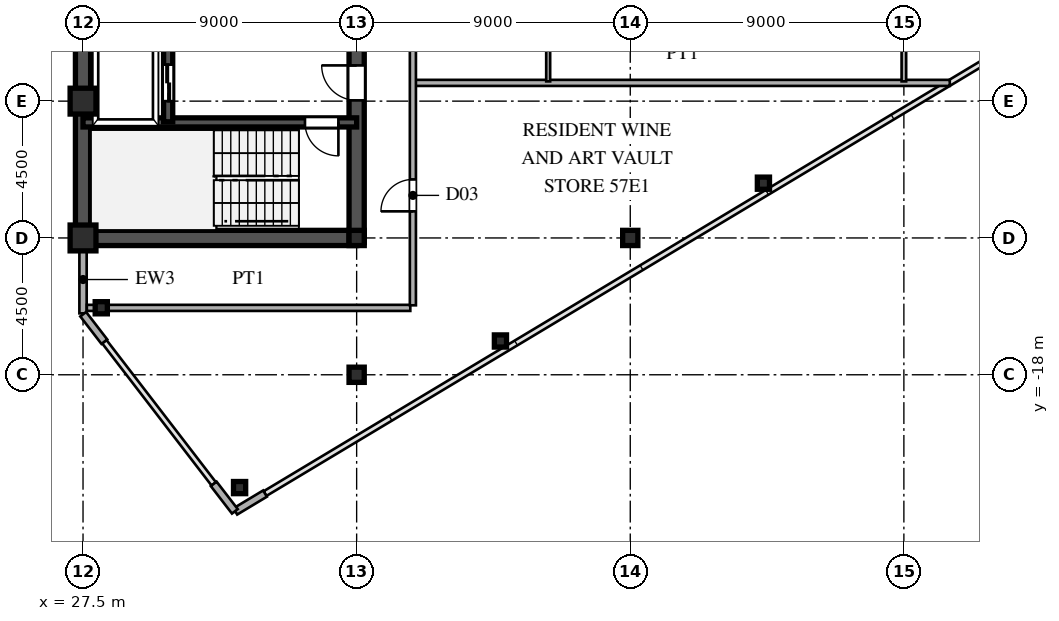
"""IFC4 building model, lengths in metres.
Left out: names, types, materials, properties, quantities, classifications, styles, units other than length and angle.
Written with IfcOpenShell. Run it as: python <this file> out.ifc"""

import sys

from ifc_helpers import new_model, si_unit, direction, frame, frame_2d, origin, origin_2d, place, context, subcontext, project, spatial, rectangle, hollow_rectangle, i_section, extrude, source, transform, mapped, element, fill, save


model = new_model("IFC4")
c1 = context("Model", 3, precision=1e-05, world=origin(), true_north=direction((0.0, 1.0)))
c2 = subcontext(c1, "Body", "Model", "MODEL_VIEW")
j1 = project(units=[si_unit("LENGTHUNIT", "METRE"), si_unit("PLANEANGLEUNIT", "RADIAN")], contexts=[c1])
p1 = place(None, origin())
s1 = spatial("IfcSite", under=j1, at=p1, CompositionType="ELEMENT")
p2 = place(p1, origin())
s2 = spatial("IfcBuilding", under=s1, at=p2, CompositionType="ELEMENT")
p3 = place(p2, frame((0.0, 0.0, 213.9)))
s3 = spatial("IfcBuildingStorey", under=s2, at=p3, CompositionType="ELEMENT", Elevation=213.9)
m1 = source(origin(), c2, "Body", "SweptSolid", [
    extrude(hollow_rectangle(XDim=0.85, YDim=0.85, WallThickness=0.036, at=origin_2d()), origin(), (0.0, 0.0, 1.0), 3.6),
])
for number, where, z_axis, x_axis in (
    (1, (27.5, -13.5, 0.0), (0.0, 0.0, 1.0), (1.0, 0.0, 0.0)),
    (2, (27.5, -9.0, 0.0), (0.0, 0.0, 1.0), (1.0, 0.0, 0.0)),
):
    element("IfcColumn", number, at=place(p3, frame(where, z_axis=z_axis, x_axis=x_axis)), inside=s3, PredefinedType="COLUMN", context=c2, shape_type="MappedRepresentation", body=[
        mapped(m1, transform((0.0, 0.0, 0.0), scale=1.0)),
    ])
m2 = source(origin(), c2, "Body", "SweptSolid", [
    extrude(i_section(OverallWidth=0.5, OverallDepth=0.5, WebThickness=0.02, FlangeThickness=0.032, at=origin_2d()), origin(), (0.0, 0.0, 1.0), 3.6),
])
for number, where, z_axis, x_axis in (
    (3, (36.5, -18.0, 0.0), (0.0, 0.0, 1.0), (1.0, 0.0, 0.0)),
    (4, (36.5, -13.5, 0.0), (0.0, 0.0, 1.0), (1.0, 0.0, 0.0)),
    (5, (45.5, -13.5, 0.0), (0.0, 0.0, 1.0), (1.0, 0.0, 0.0)),
):
    element("IfcColumn", number, at=place(p3, frame(where, z_axis=z_axis, x_axis=x_axis)), inside=s3, PredefinedType="COLUMN", context=c2, shape_type="MappedRepresentation", body=[
        mapped(m2, transform((0.0, 0.0, 0.0), scale=1.0)),
    ])
m3 = source(origin(), c2, "Body", "SweptSolid", [
    extrude(hollow_rectangle(XDim=0.4, YDim=0.4, WallThickness=0.016, at=origin_2d()), origin(), (0.0, 0.0, 1.0), 3.6),
])
for number, where, z_axis, x_axis in (
    (6, (32.65, -21.71, 0.0), (0.0, 0.0, 1.0), (1.0, 0.0, 0.0)),
    (7, (28.1, -15.796, 0.0), (0.0, 0.0, 1.0), (1.0, 0.0, 0.0)),
    (8, (41.23, -16.889, 0.0), (0.0, 0.0, 1.0), (1.0, 0.0, 0.0)),
    (9, (49.88, -11.699, 0.0), (0.0, 0.0, 1.0), (1.0, 0.0, 0.0)),
):
    element("IfcColumn", number, at=place(p3, frame(where, z_axis=z_axis, x_axis=x_axis)), inside=s3, PredefinedType="COLUMN", context=c2, shape_type="MappedRepresentation", body=[
        mapped(m3, transform((0.0, 0.0, 0.0), scale=1.0)),
    ])
p4 = place(p3, frame((32.509, -22.495, 0.0), z_axis=(0.0, 0.0, 1.0), x_axis=(0.85743623509, 0.514590228002, 0.0)))
e10 = element("IfcWall", 10, at=p4, inside=s3, PredefinedType="SOLIDWALL", context=c2, shape_type="SweptSolid", body=[
    extrude(rectangle(XDim=1.14, YDim=0.24, at=frame_2d((0.57, 0.0))), origin(), (0.0, 0.0, 1.0), 3.38),
])
p5 = place(p3, frame((27.5, -15.98, 0.0), z_axis=(0.0, 0.0, 1.0), x_axis=(0.0, 1.0, 0.0)))
e11 = element("IfcWall", 11, at=p5, inside=s3, PredefinedType="SOLIDWALL", context=c2, shape_type="SweptSolid", body=[
    extrude(rectangle(XDim=1.605, YDim=0.24, at=frame_2d((0.803, 0.0))), origin(), (0.0, 0.0, 1.0), 3.38),
])
p6 = place(p3, frame((27.5, -14.375, 0.0), z_axis=(0.0, 0.0, 1.0), x_axis=(0.0, 1.0, 0.0)))
e12 = element("IfcWall", 12, at=p6, inside=s3, PredefinedType="SOLIDWALL", context=c2, shape_type="SweptSolid", body=[
    extrude(rectangle(XDim=0.62, YDim=0.24, at=frame_2d((0.31, 0.0))), origin(), (0.0, 0.0, 1.0), 2.88),
])
for number, where, z_axis, x_axis in (
    (13, (27.506, -16.008, 0.0), (0.0, 0.0, 1.0), (0.61, -0.793, 0.0)),
    (14, (31.799, -21.588, 0.0), (0.0, 0.0, 1.0), (0.61, -0.793, 0.0)),
):
    element("IfcWall", number, at=place(p3, frame(where, z_axis=z_axis, x_axis=x_axis)), inside=s3, PredefinedType="SOLIDWALL", context=c2, shape_type="SweptSolid", body=[
        extrude(rectangle(XDim=1.14, YDim=0.24, at=frame_2d((0.57, 0.0))), origin(), (0.0, 0.0, 1.0), 3.38),
    ])
p7 = place(p3, frame((27.5, -13.5, 0.0), z_axis=(0.0, 0.0, 1.0), x_axis=(0.0, 1.0, 0.0)))
e15 = element("IfcWall", 15, at=p7, inside=s3, PredefinedType="SHEAR", context=c2, shape_type="SweptSolid", body=[
    extrude(rectangle(XDim=12.2, YDim=0.5, at=frame_2d((6.1, 0.0))), origin(), (0.0, 0.0, 1.0), 3.38),
])
p8 = place(p3, frame((27.5, -13.5, 0.0), z_axis=(0.0, 0.0, 1.0), x_axis=(1.0, 0.0, 0.0)))
e16 = element("IfcWall", 16, at=p8, inside=s3, PredefinedType="SHEAR", context=c2, shape_type="SweptSolid", body=[
    extrude(rectangle(XDim=9.0, YDim=0.5, at=frame_2d((4.5, 0.0))), origin(), (0.0, 0.0, 1.0), 3.38),
])
p9 = place(p3, frame((36.5, -13.65, 0.0), z_axis=(0.0, 0.0, 1.0), x_axis=(0.0, 1.0, 0.0)))
e17 = element("IfcWall", 17, at=p9, inside=s3, PredefinedType="SHEAR", context=c2, shape_type="SweptSolid", body=[
    extrude(rectangle(XDim=7.15, YDim=0.5, at=frame_2d((3.575, 0.0))), origin(), (0.0, 0.0, 1.0), 3.38),
])
p10 = place(p9, frame((4.675, 0.0, 0.0)))
e18 = element("IfcOpeningElement", 18, at=p10, cuts=e17, PredefinedType="OPENING", context=c2, shape_type="SweptSolid", body=[
    extrude(rectangle(XDim=1.15, YDim=2.2, at=frame_2d((0.575, 1.1))), frame((0.0, 0.26, 0.0), z_axis=(0.0, -1.0, 0.0), x_axis=(1.0, 0.0, 0.0)), (0.0, 0.0, 1.0), 0.52),
])
p11 = place(p3, frame((27.5, -9.7, 0.0), z_axis=(0.0, 0.0, 1.0), x_axis=(1.0, 0.0, 0.0)))
e19 = element("IfcWall", 19, at=p11, inside=s3, PredefinedType="SHEAR", context=c2, shape_type="SweptSolid", body=[
    extrude(rectangle(XDim=9.0, YDim=0.3, at=frame_2d((4.5, 0.0))), origin(), (0.0, 0.0, 1.0), 3.38),
])
p12 = place(p11, frame((7.3, 0.0, 0.0)))
e20 = element("IfcOpeningElement", 20, at=p12, cuts=e19, PredefinedType="OPENING", context=c2, shape_type="SweptSolid", body=[
    extrude(rectangle(XDim=1.1, YDim=2.2, at=frame_2d((0.55, 1.1))), frame((0.0, 0.16, 0.0), z_axis=(0.0, -1.0, 0.0), x_axis=(1.0, 0.0, 0.0)), (0.0, 0.0, 1.0), 0.32),
])
p13 = place(p3, frame((30.3, -9.68, 0.0), z_axis=(0.0, 0.0, 1.0), x_axis=(0.0, 1.0, 0.0)))
e21 = element("IfcWall", 21, at=p13, inside=s3, PredefinedType="SHEAR", context=c2, shape_type="SweptSolid", body=[
    extrude(rectangle(XDim=2.56, YDim=0.3, at=frame_2d((1.28, 0.0))), origin(), (0.0, 0.0, 1.0), 3.38),
])
p14 = place(p13, frame((0.68, 0.0, 0.0)))
e22 = element("IfcOpeningElement", 22, at=p14, cuts=e21, PredefinedType="OPENING", context=c2, shape_type="SweptSolid", body=[
    extrude(rectangle(XDim=1.2, YDim=2.25, at=frame_2d((0.6, 1.125))), frame((0.0, 0.16, 0.0), z_axis=(0.0, -1.0, 0.0), x_axis=(1.0, 0.0, 0.0)), (0.0, 0.0, 1.0), 0.32),
])
p15 = place(p3, frame((27.625, -15.8, 0.0), z_axis=(0.0, 0.0, 1.0), x_axis=(1.0, 0.0, 0.0)))
e23 = element("IfcWall", 23, at=p15, inside=s3, PredefinedType="PARTITIONING", context=c2, shape_type="SweptSolid", body=[
    extrude(rectangle(XDim=10.64, YDim=0.2, at=frame_2d((5.32, 0.0))), origin(), (0.0, 0.0, 1.0), 3.38),
])
p16 = place(p3, frame((38.43, -8.4, 0.0), z_axis=(0.0, 0.0, 1.0), x_axis=(1.0, 0.0, 0.0)))
e24 = element("IfcWall", 24, at=p16, inside=s3, PredefinedType="PARTITIONING", context=c2, shape_type="SweptSolid", body=[
    extrude(rectangle(XDim=17.58, YDim=0.2, at=frame_2d((8.79, 0.0))), origin(), (0.0, 0.0, 1.0), 3.38),
])
p17 = place(p3, frame((38.35, -15.715, 0.0), z_axis=(0.0, 0.0, 1.0), x_axis=(0.0, 1.0, 0.0)))
e25 = element("IfcWall", 25, at=p17, inside=s3, PredefinedType="PARTITIONING", context=c2, shape_type="SweptSolid", body=[
    extrude(rectangle(XDim=31.43, YDim=0.2, at=frame_2d((15.715, 0.0))), origin(), (0.0, 0.0, 1.0), 3.38),
])
p18 = place(p17, frame((3.09, 0.0, 0.0)))
e26 = element("IfcOpeningElement", 26, at=p18, cuts=e25, PredefinedType="OPENING", context=c2, shape_type="SweptSolid", body=[
    extrude(rectangle(XDim=1.05, YDim=2.25, at=frame_2d((0.525, 1.125))), frame((0.0, 0.11, 0.0), z_axis=(0.0, -1.0, 0.0), x_axis=(1.0, 0.0, 0.0)), (0.0, 0.0, 1.0), 0.22),
])
p19 = place(p17, frame((13.289, 0.0, 0.0)))
e27 = element("IfcOpeningElement", 27, at=p19, cuts=e25, PredefinedType="OPENING", context=c2, shape_type="SweptSolid", body=[
    extrude(rectangle(XDim=1.05, YDim=2.25, at=frame_2d((0.525, 1.125))), frame((0.0, 0.11, 0.0), z_axis=(0.0, -1.0, 0.0), x_axis=(1.0, 0.0, 0.0)), (0.0, 0.0, 1.0), 0.22),
])
p20 = place(p17, frame((25.59, 0.0, 0.0)))
e28 = element("IfcOpeningElement", 28, at=p20, cuts=e25, PredefinedType="OPENING", context=c2, shape_type="SweptSolid", body=[
    extrude(rectangle(XDim=1.05, YDim=2.25, at=frame_2d((0.525, 1.125))), frame((0.0, 0.11, 0.0), z_axis=(0.0, -1.0, 0.0), x_axis=(1.0, 0.0, 0.0)), (0.0, 0.0, 1.0), 0.22),
])
p21 = place(p3, frame((42.8, -8.35, 0.0), z_axis=(0.0, 0.0, 1.0), x_axis=(0.0, 1.0, 0.0)))
e29 = element("IfcWall", 29, at=p21, inside=s3, PredefinedType="PARTITIONING", context=c2, shape_type="SweptSolid", body=[
    extrude(rectangle(XDim=8.833, YDim=0.13, at=frame_2d((4.417, 0.0))), origin(), (0.0, 0.0, 1.0), 3.38),
])
p22 = place(p21, frame((6.175, 0.0, 0.0)))
e30 = element("IfcOpeningElement", 30, at=p22, cuts=e29, PredefinedType="OPENING", context=c2, shape_type="SweptSolid", body=[
    extrude(rectangle(XDim=0.95, YDim=2.15, at=frame_2d((0.475, 1.075))), frame((0.0, 0.075, 0.0), z_axis=(0.0, -1.0, 0.0), x_axis=(1.0, 0.0, 0.0)), (0.0, 0.0, 1.0), 0.15),
])
p23 = place(p3, frame((54.5, -8.35, 0.0), z_axis=(0.0, 0.0, 1.0), x_axis=(0.0, 1.0, 0.0)))
e31 = element("IfcWall", 31, at=p23, inside=s3, PredefinedType="PARTITIONING", context=c2, shape_type="SweptSolid", body=[
    extrude(rectangle(XDim=13.3, YDim=0.15, at=frame_2d((6.65, 0.0))), origin(), (0.0, 0.0, 1.0), 2.78),
])
p24 = place(p23, frame((6.175, 0.0, 0.0)))
e32 = element("IfcOpeningElement", 32, at=p24, cuts=e31, PredefinedType="OPENING", context=c2, shape_type="SweptSolid", body=[
    extrude(rectangle(XDim=0.95, YDim=2.15, at=frame_2d((0.475, 1.075))), frame((0.0, 0.085, 0.0), z_axis=(0.0, -1.0, 0.0), x_axis=(1.0, 0.0, 0.0)), (0.0, 0.0, 1.0), 0.17),
])
m4 = source(origin(), c2, "Body", "SweptSolid", [
    extrude(rectangle(XDim=1.15, YDim=2.2, at=frame_2d((0.575, 1.1))), frame((0.0, 0.025, 0.0), z_axis=(0.0, -1.0, 0.0), x_axis=(1.0, 0.0, 0.0)), (0.0, 0.0, 1.0), 0.05),
])
p25 = place(p10, origin())
e33 = element("IfcDoor", 33, at=p25, inside=s3, OperationType="SINGLE_SWING_RIGHT", PredefinedType="DOOR", context=c2, shape_type="MappedRepresentation", body=[
    mapped(m4, transform((0.0, 0.0, 0.0), scale=1.0)),
])
fill(e18, e33)
m5 = source(origin(), c2, "Body", "SweptSolid", [
    extrude(rectangle(XDim=1.1, YDim=2.2, at=frame_2d((0.55, 1.1))), frame((0.0, 0.025, 0.0), z_axis=(0.0, -1.0, 0.0), x_axis=(1.0, 0.0, 0.0)), (0.0, 0.0, 1.0), 0.05),
])
p26 = place(p12, frame((1.1, 0.0, 0.0), z_axis=(0.0, 0.0, 1.0), x_axis=(-1.0, 0.0, 0.0)))
e34 = element("IfcDoor", 34, at=p26, inside=s3, OperationType="SINGLE_SWING_RIGHT", PredefinedType="DOOR", context=c2, shape_type="MappedRepresentation", body=[
    mapped(m5, transform((0.0, 0.0, 0.0), scale=1.0)),
])
fill(e20, e34)
m6 = source(origin(), c2, "Body", "SweptSolid", [
    extrude(rectangle(XDim=1.2, YDim=2.25, at=frame_2d((0.6, 1.125))), frame((0.0, 0.025, 0.0), z_axis=(0.0, -1.0, 0.0), x_axis=(1.0, 0.0, 0.0)), (0.0, 0.0, 1.0), 0.05),
])
p27 = place(p14, origin())
e35 = element("IfcDoor", 35, at=p27, inside=s3, OperationType="DOUBLE_DOOR_SLIDING", PredefinedType="DOOR", context=c2, shape_type="MappedRepresentation", body=[
    mapped(m6, transform((0.0, 0.0, 0.0), scale=1.0)),
])
fill(e22, e35)
m7 = source(origin(), c2, "Body", "SweptSolid", [
    extrude(rectangle(XDim=1.05, YDim=2.25, at=frame_2d((0.525, 1.125))), frame((0.0, 0.025, 0.0), z_axis=(0.0, -1.0, 0.0), x_axis=(1.0, 0.0, 0.0)), (0.0, 0.0, 1.0), 0.05),
])
p28 = place(p18, origin())
e36 = element("IfcDoor", 36, at=p28, inside=s3, OperationType="SINGLE_SWING_LEFT", PredefinedType="DOOR", context=c2, shape_type="MappedRepresentation", body=[
    mapped(m7, transform((0.0, 0.0, 0.0), scale=1.0)),
])
fill(e26, e36)
save(model, sys.argv[1])
